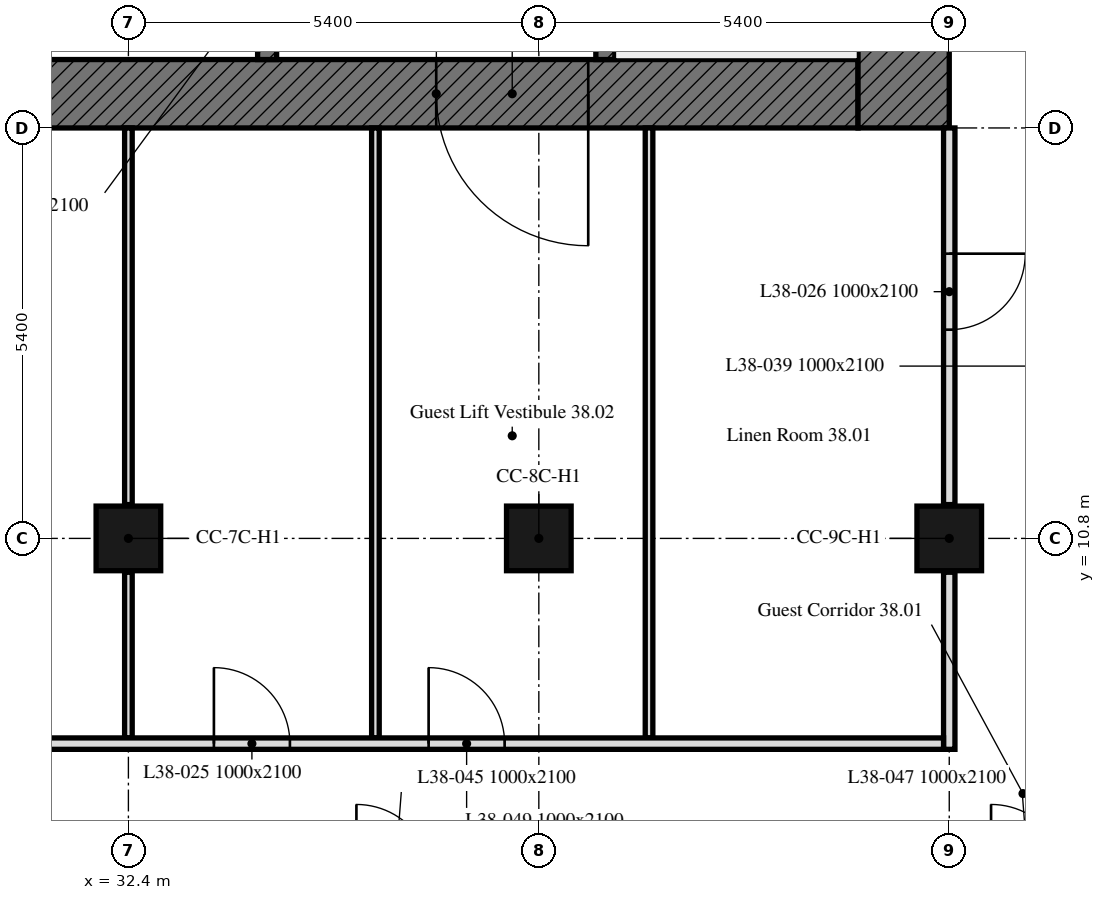
"""IFC4 building model, lengths in metres.
Left out: names, types, materials, properties, quantities, classifications, styles, units other than length and angle.
Written with IfcOpenShell. Run it as: python <this file> out.ifc"""

import sys

from ifc_helpers import new_model, si_unit, direction, frame, frame_2d, origin, origin_2d, place, context, subcontext, project, spatial, rectangle, extrude, element, fill, save


model = new_model("IFC4")
c1 = context("Model", 3, precision=1e-05, world=origin(), true_north=direction((0.0, 1.0)))
c2 = subcontext(c1, "Body", "Model", "MODEL_VIEW")
j1 = project(units=[si_unit("LENGTHUNIT", "METRE"), si_unit("PLANEANGLEUNIT", "RADIAN")], contexts=[c1])
p1 = place(None, origin())
s1 = spatial("IfcSite", under=j1, at=p1, CompositionType="ELEMENT")
p2 = place(p1, origin())
s2 = spatial("IfcBuilding", under=s1, at=p2, CompositionType="ELEMENT")
p3 = place(p2, frame((0.0, 0.0, 162.7)))
s3 = spatial("IfcBuildingStorey", under=s2, at=p3, CompositionType="ELEMENT", Elevation=162.7)
for number, where, z_axis, x_axis in (
    (1, (32.4, 10.8, 0.0), (0.0, 0.0, 1.0), (1.0, 0.0, 0.0)),
    (2, (37.8, 10.8, 0.0), (0.0, 0.0, 1.0), (1.0, 0.0, 0.0)),
    (3, (43.2, 10.8, 0.0), (0.0, 0.0, 1.0), (1.0, 0.0, 0.0)),
):
    element("IfcColumn", number, at=place(p3, frame(where, z_axis=z_axis, x_axis=x_axis)), inside=s3, PredefinedType="COLUMN", context=c2, shape_type="SweptSolid", body=[
        extrude(rectangle(XDim=0.85, YDim=0.85, at=origin_2d()), origin(), (0.0, 0.0, 1.0), 3.0),
    ])
p4 = place(p3, frame((42.0, 16.65, 0.0), z_axis=(0.0, 0.0, 1.0), x_axis=(-1.0, 0.0, 0.0)))
e4 = element("IfcWall", 4, at=p4, inside=s3, PredefinedType="SOLIDWALL", context=c2, shape_type="SweptSolid", body=[
    extrude(rectangle(XDim=11.1, YDim=0.9, at=frame_2d((5.55, 0.0))), origin(), (0.0, 0.0, 1.0), 3.0),
])
p5 = place(p4, frame((3.55, 0.0, 0.0)))
e5 = element("IfcOpeningElement", 5, at=p5, cuts=e4, PredefinedType="OPENING", context=c2, shape_type="SweptSolid", body=[
    extrude(rectangle(XDim=2.0, YDim=2.4, at=frame_2d((1.0, 1.2))), frame((0.0, 0.45, 0.0), z_axis=(0.0, -1.0, 0.0), x_axis=(1.0, 0.0, 0.0)), (0.0, 0.0, 1.0), 0.9),
])
p6 = place(p3, frame((42.6, 32.4, 0.0), z_axis=(0.0, 0.0, 1.0), x_axis=(0.0, -1.0, 0.0)))
e6 = element("IfcWall", 6, at=p6, inside=s3, PredefinedType="SOLIDWALL", context=c2, shape_type="SweptSolid", body=[
    extrude(rectangle(XDim=16.2, YDim=1.2, at=frame_2d((8.1, 0.0))), origin(), (0.0, 0.0, 1.0), 3.0),
])
p7 = place(p3, frame((38.675, 17.1, 0.0), z_axis=(0.0, 0.0, 1.0), x_axis=(0.0, 1.0, 0.0)))
e7 = element("IfcWall", 7, at=p7, inside=s3, PredefinedType="SOLIDWALL", context=c2, shape_type="SweptSolid", body=[
    extrude(rectangle(XDim=14.4, YDim=0.25, at=frame_2d((7.2, 0.0))), origin(), (0.0, 0.0, 1.0), 3.0),
])
p8 = place(p7, frame((4.6, 0.0, 0.0)))
e8 = element("IfcOpeningElement", 8, at=p8, cuts=e7, PredefinedType="OPENING", context=c2, shape_type="SweptSolid", body=[
    extrude(rectangle(XDim=1.0, YDim=2.1, at=frame_2d((0.5, 1.05))), frame((0.0, 0.125, 0.0), z_axis=(0.0, -1.0, 0.0), x_axis=(1.0, 0.0, 0.0)), (0.0, 0.0, 1.0), 0.25),
])
p9 = place(p7, frame((7.062, 0.0, 0.0)))
e9 = element("IfcOpeningElement", 9, at=p9, cuts=e7, PredefinedType="OPENING", context=c2, shape_type="SweptSolid", body=[
    extrude(rectangle(XDim=1.2, YDim=2.1, at=frame_2d((0.6, 1.05))), frame((0.0, 0.125, 0.0), z_axis=(0.0, -1.0, 0.0), x_axis=(1.0, 0.0, 0.0)), (0.0, 0.0, 1.0), 0.25),
])
p10 = place(p7, frame((9.726, 0.0, 0.0)))
e10 = element("IfcOpeningElement", 10, at=p10, cuts=e7, PredefinedType="OPENING", context=c2, shape_type="SweptSolid", body=[
    extrude(rectangle(XDim=0.9, YDim=2.1, at=frame_2d((0.45, 1.05))), frame((0.0, 0.125, 0.0), z_axis=(0.0, -1.0, 0.0), x_axis=(1.0, 0.0, 0.0)), (0.0, 0.0, 1.0), 0.25),
])
p11 = place(p7, frame((11.539, 0.0, 0.0)))
e11 = element("IfcOpeningElement", 11, at=p11, cuts=e7, PredefinedType="OPENING", context=c2, shape_type="SweptSolid", body=[
    extrude(rectangle(XDim=0.9, YDim=2.1, at=frame_2d((0.45, 1.05))), frame((0.0, 0.125, 0.0), z_axis=(0.0, -1.0, 0.0), x_axis=(1.0, 0.0, 0.0)), (0.0, 0.0, 1.0), 0.25),
])
p12 = place(p7, frame((13.226, 0.0, 0.0)))
e12 = element("IfcOpeningElement", 12, at=p12, cuts=e7, PredefinedType="OPENING", context=c2, shape_type="SweptSolid", body=[
    extrude(rectangle(XDim=0.9, YDim=2.1, at=frame_2d((0.45, 1.05))), frame((0.0, 0.125, 0.0), z_axis=(0.0, -1.0, 0.0), x_axis=(1.0, 0.0, 0.0)), (0.0, 0.0, 1.0), 0.25),
])
p13 = place(p3, frame((34.225, 17.1, 0.0), z_axis=(0.0, 0.0, 1.0), x_axis=(0.0, 1.0, 0.0)))
e13 = element("IfcWall", 13, at=p13, inside=s3, PredefinedType="SOLIDWALL", context=c2, shape_type="SweptSolid", body=[
    extrude(rectangle(XDim=14.4, YDim=0.25, at=frame_2d((7.2, 0.0))), origin(), (0.0, 0.0, 1.0), 3.0),
])
p14 = place(p13, frame((13.15, 0.0, 0.0)))
e14 = element("IfcOpeningElement", 14, at=p14, cuts=e13, PredefinedType="OPENING", context=c2, shape_type="SweptSolid", body=[
    extrude(rectangle(XDim=1.0, YDim=2.1, at=frame_2d((0.5, 1.05))), frame((0.0, 0.125, 0.0), z_axis=(0.0, -1.0, 0.0), x_axis=(1.0, 0.0, 0.0)), (0.0, 0.0, 1.0), 0.25),
])
p15 = place(p13, frame((0.6, 0.0, 0.0)))
e15 = element("IfcOpeningElement", 15, at=p15, cuts=e13, PredefinedType="OPENING", context=c2, shape_type="SweptSolid", body=[
    extrude(rectangle(XDim=1.1, YDim=2.1, at=frame_2d((0.55, 1.05))), frame((0.0, 0.125, 0.0), z_axis=(0.0, -1.0, 0.0), x_axis=(1.0, 0.0, 0.0)), (0.0, 0.0, 1.0), 0.25),
])
p16 = place(p13, frame((3.25, 0.0, 0.0)))
e16 = element("IfcOpeningElement", 16, at=p16, cuts=e13, PredefinedType="OPENING", context=c2, shape_type="SweptSolid", body=[
    extrude(rectangle(XDim=0.9, YDim=2.1, at=frame_2d((0.45, 1.05))), frame((0.0, 0.125, 0.0), z_axis=(0.0, -1.0, 0.0), x_axis=(1.0, 0.0, 0.0)), (0.0, 0.0, 1.0), 0.25),
])
p17 = place(p3, frame((32.4, 8.175, 0.0), z_axis=(0.0, 0.0, 1.0), x_axis=(0.0, 1.0, 0.0)))
e17 = element("IfcWall", 17, at=p17, inside=s3, PredefinedType="PARTITIONING", context=c2, shape_type="SweptSolid", body=[
    extrude(rectangle(XDim=2.18, YDim=0.1, at=frame_2d((1.09, 0.0))), origin(), (0.0, 0.0, 1.0), 2.4),
])
p18 = place(p3, frame((32.4, 11.245, 0.0), z_axis=(0.0, 0.0, 1.0), x_axis=(0.0, 1.0, 0.0)))
e18 = element("IfcWall", 18, at=p18, inside=s3, PredefinedType="PARTITIONING", context=c2, shape_type="SweptSolid", body=[
    extrude(rectangle(XDim=4.955, YDim=0.1, at=frame_2d((2.478, 0.0))), origin(), (0.0, 0.0, 1.0), 2.4),
])
for number, where, z_axis, x_axis in (
    (19, (35.65, 16.2, 0.0), (0.0, 0.0, 1.0), (0.0, -1.0, 0.0)),
    (20, (39.25, 8.175, 0.0), (0.0, 0.0, 1.0), (0.0, 1.0, 0.0)),
):
    element("IfcWall", number, at=place(p3, frame(where, z_axis=z_axis, x_axis=x_axis)), inside=s3, PredefinedType="PARTITIONING", context=c2, shape_type="SweptSolid", body=[
        extrude(rectangle(XDim=8.025, YDim=0.1, at=frame_2d((4.012, 0.0))), origin(), (0.0, 0.0, 1.0), 2.4),
    ])
p19 = place(p3, frame((43.2, 16.2, 0.0), z_axis=(0.0, 0.0, 1.0), x_axis=(0.0, -1.0, 0.0)))
e21 = element("IfcWall", 21, at=p19, inside=s3, PredefinedType="PARTITIONING", context=c2, shape_type="SweptSolid", body=[
    extrude(rectangle(XDim=4.955, YDim=0.15, at=frame_2d((2.478, 0.0))), origin(), (0.0, 0.0, 1.0), 3.0),
])
p20 = place(p19, frame((1.654, 0.0, 0.0)))
e22 = element("IfcOpeningElement", 22, at=p20, cuts=e21, PredefinedType="OPENING", context=c2, shape_type="SweptSolid", body=[
    extrude(rectangle(XDim=1.0, YDim=2.1, at=frame_2d((0.5, 1.05))), frame((0.0, 0.075, 0.0), z_axis=(0.0, -1.0, 0.0), x_axis=(1.0, 0.0, 0.0)), (0.0, 0.0, 1.0), 0.15),
])
p21 = place(p3, frame((43.2, 10.355, 0.0), z_axis=(0.0, 0.0, 1.0), x_axis=(0.0, -1.0, 0.0)))
e23 = element("IfcWall", 23, at=p21, inside=s3, PredefinedType="PARTITIONING", context=c2, shape_type="SweptSolid", body=[
    extrude(rectangle(XDim=2.33, YDim=0.15, at=frame_2d((1.165, 0.0))), origin(), (0.0, 0.0, 1.0), 3.0),
])
p22 = place(p3, frame((6.151, 8.1, 0.0), z_axis=(0.0, 0.0, 1.0), x_axis=(1.0, 0.0, 0.0)))
e24 = element("IfcWall", 24, at=p22, inside=s3, PredefinedType="PARTITIONING", context=c2, shape_type="SweptSolid", body=[
    extrude(rectangle(XDim=36.974, YDim=0.15, at=frame_2d((18.487, 0.0))), origin(), (0.0, 0.0, 1.0), 2.4),
])
p23 = place(p22, frame((13.416, 0.0, 0.0)))
e25 = element("IfcOpeningElement", 25, at=p23, cuts=e24, PredefinedType="OPENING", context=c2, shape_type="SweptSolid", body=[
    extrude(rectangle(XDim=1.0, YDim=2.1, at=frame_2d((0.5, 1.05))), frame((0.0, 0.075, 0.0), z_axis=(0.0, -1.0, 0.0), x_axis=(1.0, 0.0, 0.0)), (0.0, 0.0, 1.0), 0.15),
])
p24 = place(p22, frame((23.049, 0.0, 0.0)))
e26 = element("IfcOpeningElement", 26, at=p24, cuts=e24, PredefinedType="OPENING", context=c2, shape_type="SweptSolid", body=[
    extrude(rectangle(XDim=1.0, YDim=2.1, at=frame_2d((0.5, 1.05))), frame((0.0, 0.075, 0.0), z_axis=(0.0, -1.0, 0.0), x_axis=(1.0, 0.0, 0.0)), (0.0, 0.0, 1.0), 0.15),
])
p25 = place(p22, frame((2.029, 0.0, 0.0)))
e27 = element("IfcOpeningElement", 27, at=p25, cuts=e24, PredefinedType="OPENING", context=c2, shape_type="SweptSolid", body=[
    extrude(rectangle(XDim=1.0, YDim=2.1, at=frame_2d((0.5, 1.05))), frame((0.0, 0.075, 0.0), z_axis=(0.0, -1.0, 0.0), x_axis=(1.0, 0.0, 0.0)), (0.0, 0.0, 1.0), 0.15),
])
p26 = place(p22, frame((27.374, 0.0, 0.0)))
e28 = element("IfcOpeningElement", 28, at=p26, cuts=e24, PredefinedType="OPENING", context=c2, shape_type="SweptSolid", body=[
    extrude(rectangle(XDim=1.0, YDim=2.1, at=frame_2d((0.5, 1.05))), frame((0.0, 0.075, 0.0), z_axis=(0.0, -1.0, 0.0), x_axis=(1.0, 0.0, 0.0)), (0.0, 0.0, 1.0), 0.15),
])
p27 = place(p22, frame((7.924, 0.0, 0.0)))
e29 = element("IfcOpeningElement", 29, at=p27, cuts=e24, PredefinedType="OPENING", context=c2, shape_type="SweptSolid", body=[
    extrude(rectangle(XDim=1.0, YDim=2.1, at=frame_2d((0.5, 1.05))), frame((0.0, 0.075, 0.0), z_axis=(0.0, -1.0, 0.0), x_axis=(1.0, 0.0, 0.0)), (0.0, 0.0, 1.0), 0.15),
])
p28 = place(p22, frame((4.699, 0.0, 0.0)))
e30 = element("IfcOpeningElement", 30, at=p28, cuts=e24, PredefinedType="OPENING", context=c2, shape_type="SweptSolid", body=[
    extrude(rectangle(XDim=1.8, YDim=2.4, at=frame_2d((0.9, 1.2))), frame((0.0, 0.075, 0.0), z_axis=(0.0, -1.0, 0.0), x_axis=(1.0, 0.0, 0.0)), (0.0, 0.0, 1.0), 0.15),
])
p29 = place(p22, frame((30.199, 0.0, 0.0)))
e31 = element("IfcOpeningElement", 31, at=p29, cuts=e24, PredefinedType="OPENING", context=c2, shape_type="SweptSolid", body=[
    extrude(rectangle(XDim=1.0, YDim=2.1, at=frame_2d((0.5, 1.05))), frame((0.0, 0.075, 0.0), z_axis=(0.0, -1.0, 0.0), x_axis=(1.0, 0.0, 0.0)), (0.0, 0.0, 1.0), 0.15),
])
p30 = place(p5, origin())
e32 = element("IfcDoor", 32, at=p30, inside=s3, OperationType="DOUBLE_DOOR_SINGLE_SWING", PredefinedType="DOOR", context=c2, shape_type="SweptSolid", body=[
    extrude(rectangle(XDim=2.0, YDim=2.4, at=frame_2d((1.0, 1.2))), frame((0.0, 0.025, 0.0), z_axis=(0.0, -1.0, 0.0), x_axis=(1.0, 0.0, 0.0)), (0.0, 0.0, 1.0), 0.05),
])
fill(e5, e32)
p31 = place(p26, origin())
e33 = element("IfcDoor", 33, at=p31, inside=s3, OperationType="SINGLE_SWING_RIGHT", PredefinedType="DOOR", context=c2, shape_type="SweptSolid", body=[
    extrude(rectangle(XDim=1.0, YDim=2.1, at=frame_2d((0.5, 1.05))), frame((0.0, 0.025, 0.0), z_axis=(0.0, -1.0, 0.0), x_axis=(1.0, 0.0, 0.0)), (0.0, 0.0, 1.0), 0.05),
])
fill(e28, e33)
p32 = place(p20, origin())
e34 = element("IfcDoor", 34, at=p32, inside=s3, OperationType="SINGLE_SWING_LEFT", PredefinedType="DOOR", context=c2, shape_type="SweptSolid", body=[
    extrude(rectangle(XDim=1.0, YDim=2.1, at=frame_2d((0.5, 1.05))), frame((0.0, 0.025, 0.0), z_axis=(0.0, -1.0, 0.0), x_axis=(1.0, 0.0, 0.0)), (0.0, 0.0, 1.0), 0.05),
])
fill(e22, e34)
p33 = place(p29, origin())
e35 = element("IfcDoor", 35, at=p33, inside=s3, OperationType="SINGLE_SWING_LEFT", PredefinedType="DOOR", context=c2, shape_type="SweptSolid", body=[
    extrude(rectangle(XDim=1.0, YDim=2.1, at=frame_2d((0.5, 1.05))), frame((0.0, 0.025, 0.0), z_axis=(0.0, -1.0, 0.0), x_axis=(1.0, 0.0, 0.0)), (0.0, 0.0, 1.0), 0.05),
])
fill(e31, e35)
save(model, sys.argv[1])
